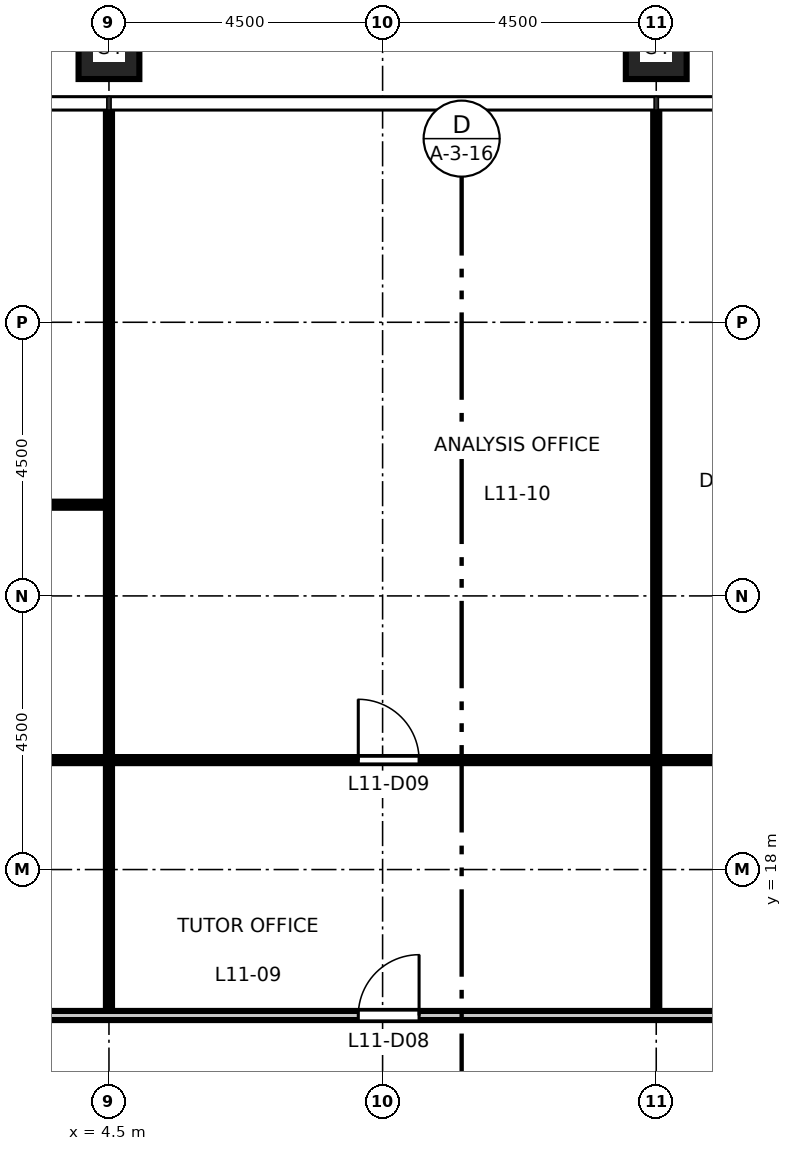
"""IFC4 building model, lengths in metres.
Left out: names, types, materials, properties, quantities, classifications, styles, units other than length and angle.
Written with IfcOpenShell. Run it as: python <this file> out.ifc"""

import sys

from ifc_helpers import new_model, si_unit, direction, frame, frame_2d, origin, origin_2d, place, context, subcontext, project, spatial, rectangle, hollow_rectangle, extrude, element, fill, save


model = new_model("IFC4")
c1 = context("Model", 3, precision=1e-05, world=origin(), true_north=direction((0.0, 1.0)))
c2 = subcontext(c1, "Body", "Model", "MODEL_VIEW")
j1 = project(units=[si_unit("LENGTHUNIT", "METRE"), si_unit("PLANEANGLEUNIT", "RADIAN")], contexts=[c1])
p1 = place(None, origin())
s1 = spatial("IfcSite", under=j1, at=p1, CompositionType="ELEMENT")
p2 = place(p1, origin())
s2 = spatial("IfcBuilding", under=s1, at=p2, CompositionType="ELEMENT")
p3 = place(p2, frame((0.0, 0.0, 53.7)))
s3 = spatial("IfcBuildingStorey", under=s2, at=p3, CompositionType="ELEMENT", Elevation=53.7)
for number, where, z_axis, x_axis in (
    (1, (13.5, 31.5, 0.0), (0.0, 0.0, 1.0), (1.0, 0.0, 0.0)),
    (2, (4.5, 31.5, 0.0), (0.0, 0.0, 1.0), (1.0, 0.0, 0.0)),
):
    element("IfcColumn", number, at=place(p3, frame(where, z_axis=z_axis, x_axis=x_axis)), inside=s3, PredefinedType="COLUMN", context=c2, shape_type="SweptSolid", body=[
        extrude(hollow_rectangle(XDim=1.0, YDim=1.0, WallThickness=0.06, at=origin_2d()), origin(), (0.0, 0.0, 1.0), 4.5),
    ])
p4 = place(p3, frame((-23.925, 15.6, 0.0), z_axis=(0.0, 0.0, 1.0), x_axis=(1.0, 0.0, 0.0)))
e3 = element("IfcWall", 3, at=p4, inside=s3, PredefinedType="PARTITIONING", context=c2, shape_type="SweptSolid", body=[
    extrude(rectangle(XDim=47.85, YDim=0.15, at=frame_2d((23.925, 0.0))), origin(), (0.0, 0.0, 1.0), 4.35),
])
p5 = place(p4, frame((5.525, 0.0, 0.0)))
e4 = element("IfcOpeningElement", 4, at=p5, cuts=e3, PredefinedType="OPENING", context=c2, shape_type="SweptSolid", body=[
    extrude(rectangle(XDim=1.0, YDim=2.1, at=frame_2d((0.5, 1.05))), frame((0.0, 0.085, 0.0), z_axis=(0.0, -1.0, 0.0), x_axis=(1.0, 0.0, 0.0)), (0.0, 0.0, 1.0), 0.17),
])
p6 = place(p4, frame((14.525, 0.0, 0.0)))
e5 = element("IfcOpeningElement", 5, at=p6, cuts=e3, PredefinedType="OPENING", context=c2, shape_type="SweptSolid", body=[
    extrude(rectangle(XDim=1.0, YDim=2.1, at=frame_2d((0.5, 1.05))), frame((0.0, 0.085, 0.0), z_axis=(0.0, -1.0, 0.0), x_axis=(1.0, 0.0, 0.0)), (0.0, 0.0, 1.0), 0.17),
])
p7 = place(p4, frame((23.525, 0.0, 0.0)))
e6 = element("IfcOpeningElement", 6, at=p7, cuts=e3, PredefinedType="OPENING", context=c2, shape_type="SweptSolid", body=[
    extrude(rectangle(XDim=1.0, YDim=2.1, at=frame_2d((0.5, 1.05))), frame((0.0, 0.085, 0.0), z_axis=(0.0, -1.0, 0.0), x_axis=(1.0, 0.0, 0.0)), (0.0, 0.0, 1.0), 0.17),
])
p8 = place(p4, frame((32.525, 0.0, 0.0)))
e7 = element("IfcOpeningElement", 7, at=p8, cuts=e3, PredefinedType="OPENING", context=c2, shape_type="SweptSolid", body=[
    extrude(rectangle(XDim=1.0, YDim=2.1, at=frame_2d((0.5, 1.05))), frame((0.0, 0.085, 0.0), z_axis=(0.0, -1.0, 0.0), x_axis=(1.0, 0.0, 0.0)), (0.0, 0.0, 1.0), 0.17),
])
p9 = place(p4, frame((41.525, 0.0, 0.0)))
e8 = element("IfcOpeningElement", 8, at=p9, cuts=e3, PredefinedType="OPENING", context=c2, shape_type="SweptSolid", body=[
    extrude(rectangle(XDim=1.0, YDim=2.1, at=frame_2d((0.5, 1.05))), frame((0.0, 0.085, 0.0), z_axis=(0.0, -1.0, 0.0), x_axis=(1.0, 0.0, 0.0)), (0.0, 0.0, 1.0), 0.17),
])
p10 = place(p3, frame((-4.45, 19.8, 0.0), z_axis=(0.0, 0.0, 1.0), x_axis=(1.0, 0.0, 0.0)))
e9 = element("IfcWall", 9, at=p10, inside=s3, PredefinedType="PARTITIONING", context=c2, shape_type="SweptSolid", body=[
    extrude(rectangle(XDim=26.9, YDim=0.1, at=frame_2d((13.45, 0.0))), origin(), (0.0, 0.0, 1.0), 4.35),
])
p11 = place(p10, frame((4.05, 0.0, 0.0)))
e10 = element("IfcOpeningElement", 10, at=p11, cuts=e9, PredefinedType="OPENING", context=c2, shape_type="SweptSolid", body=[
    extrude(rectangle(XDim=1.0, YDim=2.1, at=frame_2d((0.5, 1.05))), frame((0.0, 0.06, 0.0), z_axis=(0.0, -1.0, 0.0), x_axis=(1.0, 0.0, 0.0)), (0.0, 0.0, 1.0), 0.12),
])
p12 = place(p10, frame((13.05, 0.0, 0.0)))
e11 = element("IfcOpeningElement", 11, at=p12, cuts=e9, PredefinedType="OPENING", context=c2, shape_type="SweptSolid", body=[
    extrude(rectangle(XDim=1.0, YDim=2.1, at=frame_2d((0.5, 1.05))), frame((0.0, 0.06, 0.0), z_axis=(0.0, -1.0, 0.0), x_axis=(1.0, 0.0, 0.0)), (0.0, 0.0, 1.0), 0.12),
])
p13 = place(p10, frame((22.05, 0.0, 0.0)))
e12 = element("IfcOpeningElement", 12, at=p13, cuts=e9, PredefinedType="OPENING", context=c2, shape_type="SweptSolid", body=[
    extrude(rectangle(XDim=1.0, YDim=2.1, at=frame_2d((0.5, 1.05))), frame((0.0, 0.06, 0.0), z_axis=(0.0, -1.0, 0.0), x_axis=(1.0, 0.0, 0.0)), (0.0, 0.0, 1.0), 0.12),
])
p14 = place(p3, frame((-4.45, 24.0, 0.0), z_axis=(0.0, 0.0, 1.0), x_axis=(1.0, 0.0, 0.0)))
e13 = element("IfcWall", 13, at=p14, inside=s3, PredefinedType="PARTITIONING", context=c2, shape_type="SweptSolid", body=[
    extrude(rectangle(XDim=8.9, YDim=0.1, at=frame_2d((4.45, 0.0))), origin(), (0.0, 0.0, 1.0), 3.85),
])
p15 = place(p14, frame((4.05, 0.0, 0.0)))
e14 = element("IfcOpeningElement", 14, at=p15, cuts=e13, PredefinedType="OPENING", context=c2, shape_type="SweptSolid", body=[
    extrude(rectangle(XDim=1.0, YDim=2.1, at=frame_2d((0.5, 1.05))), frame((0.0, 0.06, 0.0), z_axis=(0.0, -1.0, 0.0), x_axis=(1.0, 0.0, 0.0)), (0.0, 0.0, 1.0), 0.12),
])
p16 = place(p3, frame((4.5, 15.675, 0.0), z_axis=(0.0, 0.0, 1.0), x_axis=(0.0, 1.0, 0.0)))
e15 = element("IfcWall", 15, at=p16, inside=s3, PredefinedType="PARTITIONING", context=c2, shape_type="SweptSolid", body=[
    extrude(rectangle(XDim=4.075, YDim=0.1, at=frame_2d((2.038, 0.0))), origin(), (0.0, 0.0, 1.0), 3.35),
])
p17 = place(p3, frame((4.5, 19.85, 0.0), z_axis=(0.0, 0.0, 1.0), x_axis=(0.0, 1.0, 0.0)))
e16 = element("IfcWall", 16, at=p17, inside=s3, PredefinedType="PARTITIONING", context=c2, shape_type="SweptSolid", body=[
    extrude(rectangle(XDim=10.66, YDim=0.1, at=frame_2d((5.33, 0.0))), origin(), (0.0, 0.0, 1.0), 3.35),
])
p18 = place(p3, frame((13.5, 15.675, 0.0), z_axis=(0.0, 0.0, 1.0), x_axis=(0.0, 1.0, 0.0)))
e17 = element("IfcWall", 17, at=p18, inside=s3, PredefinedType="PARTITIONING", context=c2, shape_type="SweptSolid", body=[
    extrude(rectangle(XDim=4.075, YDim=0.1, at=frame_2d((2.038, 0.0))), origin(), (0.0, 0.0, 1.0), 3.35),
])
p19 = place(p3, frame((13.5, 19.85, 0.0), z_axis=(0.0, 0.0, 1.0), x_axis=(0.0, 1.0, 0.0)))
e18 = element("IfcWall", 18, at=p19, inside=s3, PredefinedType="PARTITIONING", context=c2, shape_type="SweptSolid", body=[
    extrude(rectangle(XDim=10.66, YDim=0.1, at=frame_2d((5.33, 0.0))), origin(), (0.0, 0.0, 1.0), 3.35),
])
p20 = place(p8, origin())
e19 = element("IfcDoor", 19, at=p20, inside=s3, OperationType="SINGLE_SWING_RIGHT", PredefinedType="DOOR", context=c2, shape_type="SweptSolid", body=[
    extrude(rectangle(XDim=1.0, YDim=2.1, at=frame_2d((0.5, 1.05))), frame((0.0, 0.025, 0.0), z_axis=(0.0, -1.0, 0.0), x_axis=(1.0, 0.0, 0.0)), (0.0, 0.0, 1.0), 0.05),
])
fill(e7, e19)
p21 = place(p12, origin())
e20 = element("IfcDoor", 20, at=p21, inside=s3, OperationType="SINGLE_SWING_LEFT", PredefinedType="DOOR", context=c2, shape_type="SweptSolid", body=[
    extrude(rectangle(XDim=1.0, YDim=2.1, at=frame_2d((0.5, 1.05))), frame((0.0, 0.025, 0.0), z_axis=(0.0, -1.0, 0.0), x_axis=(1.0, 0.0, 0.0)), (0.0, 0.0, 1.0), 0.05),
])
fill(e11, e20)
save(model, sys.argv[1])
